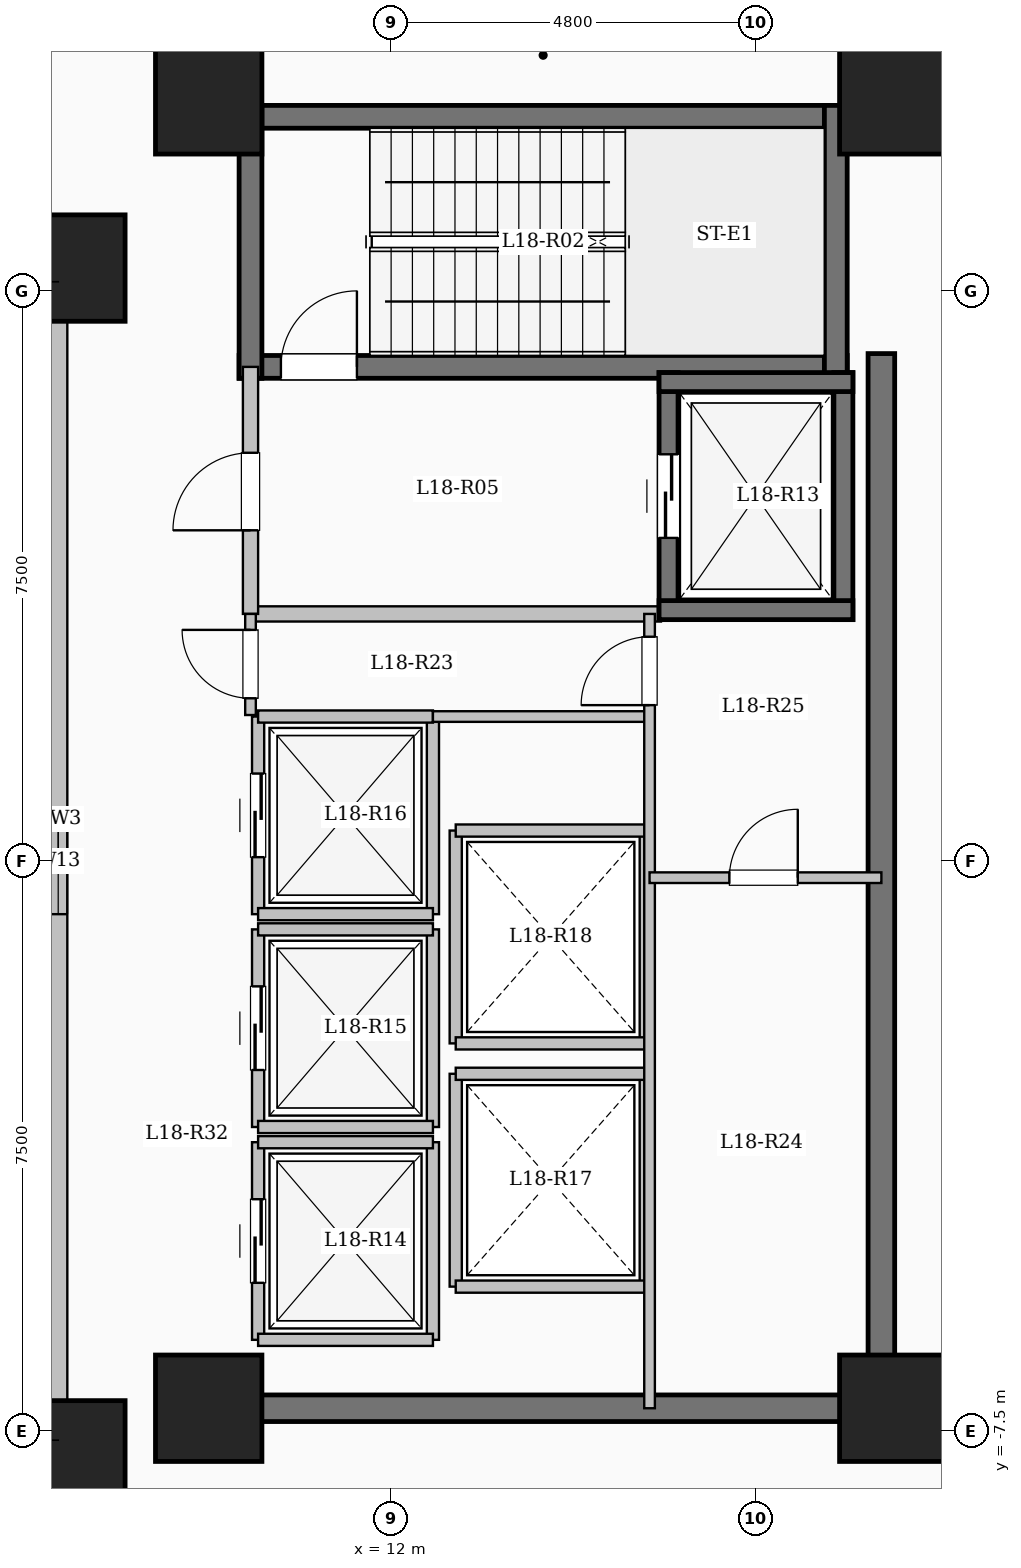
"""IFC4 building model, lengths in metres.
Left out: names, types, materials, properties, quantities, classifications, styles, units other than length and angle.
Written with IfcOpenShell. Run it as: python <this file> out.ifc"""

import sys

from ifc_helpers import new_model, si_unit, direction, frame, frame_2d, origin, origin_2d, place, context, subcontext, project, spatial, rectangle, extrude, element, fill, save


model = new_model("IFC4")
c1 = context("Model", 3, precision=1e-05, world=origin(), true_north=direction((0.0, 1.0)))
c2 = subcontext(c1, "Body", "Model", "MODEL_VIEW")
j1 = project(units=[si_unit("LENGTHUNIT", "METRE"), si_unit("PLANEANGLEUNIT", "RADIAN")], contexts=[c1])
p1 = place(None, origin())
s1 = spatial("IfcSite", under=j1, at=p1, CompositionType="ELEMENT")
p2 = place(p1, origin())
s2 = spatial("IfcBuilding", under=s1, at=p2, CompositionType="ELEMENT")
p3 = place(p2, frame((0.0, 0.0, 68.7)))
s3 = spatial("IfcBuildingStorey", under=s2, at=p3, CompositionType="ELEMENT", Elevation=68.7)
for number, where, z_axis, x_axis in (
    (1, (7.8, -7.8, 0.0), (0.0, 0.0, 1.0), (1.0, 0.0, 0.0)),
    (2, (7.8, 7.8, 0.0), (0.0, 0.0, 1.0), (1.0, 0.0, 0.0)),
    (3, (9.6, -7.2, 0.0), (0.0, 0.0, 1.0), (1.0, 0.0, 0.0)),
    (4, (9.6, 10.0, 0.0), (0.0, 0.0, 1.0), (1.0, 0.0, 0.0)),
    (5, (18.6, -7.2, 0.0), (0.0, 0.0, 1.0), (1.0, 0.0, 0.0)),
    (6, (18.6, 10.0, 0.0), (0.0, 0.0, 1.0), (1.0, 0.0, 0.0)),
):
    element("IfcColumn", number, at=place(p3, frame(where, z_axis=z_axis, x_axis=x_axis)), inside=s3, PredefinedType="COLUMN", context=c2, shape_type="SweptSolid", body=[
        extrude(rectangle(XDim=1.4, YDim=1.4, at=origin_2d()), origin(), (0.0, 0.0, 1.0), 4.5),
    ])
p4 = place(p3, frame((7.62, -7.62, 0.0), z_axis=(0.0, 0.0, 1.0), x_axis=(0.0, 1.0, 0.0)))
e7 = element("IfcWall", 7, at=p4, inside=s3, PredefinedType="SOLIDWALL", context=c2, shape_type="SweptSolid", body=[
    extrude(rectangle(XDim=15.24, YDim=0.24, at=frame_2d((7.62, 0.0))), origin(), (0.0, 0.0, 1.0), 4.2),
])
p5 = place(p4, frame((6.92, 0.0, 0.95)))
e8 = element("IfcOpeningElement", 8, at=p5, cuts=e7, PredefinedType="OPENING", context=c2, shape_type="SweptSolid", body=[
    extrude(rectangle(XDim=1.4, YDim=1.5, at=frame_2d((0.7, 0.75))), frame((0.0, 0.13, 0.0), z_axis=(0.0, -1.0, 0.0), x_axis=(1.0, 0.0, 0.0)), (0.0, 0.0, 1.0), 0.26),
])
p6 = place(p3, frame((10.0, 9.79, 0.0), z_axis=(0.0, 0.0, 1.0), x_axis=(1.0, 0.0, 0.0)))
e9 = element("IfcWall", 9, at=p6, inside=s3, PredefinedType="SHEAR", context=c2, shape_type="SweptSolid", body=[
    extrude(rectangle(XDim=8.0, YDim=0.3, at=frame_2d((4.0, 0.0))), origin(), (0.0, 0.0, 1.0), 4.5),
])
p7 = place(p3, frame((10.0, 6.5, 0.0), z_axis=(0.0, 0.0, 1.0), x_axis=(1.0, 0.0, 0.0)))
e10 = element("IfcWall", 10, at=p7, inside=s3, PredefinedType="SHEAR", context=c2, shape_type="SweptSolid", body=[
    extrude(rectangle(XDim=8.0, YDim=0.3, at=frame_2d((4.0, 0.0))), origin(), (0.0, 0.0, 1.0), 4.5),
])
p8 = place(p7, frame((0.55, 0.0, 0.0)))
e11 = element("IfcOpeningElement", 11, at=p8, cuts=e10, PredefinedType="OPENING", context=c2, shape_type="SweptSolid", body=[
    extrude(rectangle(XDim=1.0, YDim=2.15, at=frame_2d((0.5, 1.075))), frame((0.0, 0.16, 0.0), z_axis=(0.0, -1.0, 0.0), x_axis=(1.0, 0.0, 0.0)), (0.0, 0.0, 1.0), 0.32),
])
for number, where, z_axis, x_axis in (
    (12, (10.15, 6.35, 0.0), (0.0, 0.0, 1.0), (0.0, 1.0, 0.0)),
    (13, (17.85, 6.35, 0.0), (0.0, 0.0, 1.0), (0.0, 1.0, 0.0)),
):
    element("IfcWall", number, at=place(p3, frame(where, z_axis=z_axis, x_axis=x_axis)), inside=s3, PredefinedType="SHEAR", context=c2, shape_type="SweptSolid", body=[
        extrude(rectangle(XDim=3.59, YDim=0.3, at=frame_2d((1.795, 0.0))), origin(), (0.0, 0.0, 1.0), 4.5),
    ])
p9 = place(p3, frame((10.15, 3.25, 0.0), z_axis=(0.0, 0.0, 1.0), x_axis=(1.0, 0.0, 0.0)))
e14 = element("IfcWall", 14, at=p9, inside=s3, PredefinedType="SOLIDWALL", context=c2, shape_type="SweptSolid", body=[
    extrude(rectangle(XDim=5.4, YDim=0.2, at=frame_2d((2.7, 0.0))), origin(), (0.0, 0.0, 1.0), 4.2),
])
p10 = place(p3, frame((10.15, 3.25, 0.0), z_axis=(0.0, 0.0, 1.0), x_axis=(0.0, 1.0, 0.0)))
e15 = element("IfcWall", 15, at=p10, inside=s3, PredefinedType="SOLIDWALL", context=c2, shape_type="SweptSolid", body=[
    extrude(rectangle(XDim=3.25, YDim=0.2, at=frame_2d((1.625, 0.0))), origin(), (0.0, 0.0, 1.0), 4.2),
])
p11 = place(p10, frame((1.1, 0.0, 0.0)))
e16 = element("IfcOpeningElement", 16, at=p11, cuts=e15, PredefinedType="OPENING", context=c2, shape_type="SweptSolid", body=[
    extrude(rectangle(XDim=1.02, YDim=2.15, at=frame_2d((0.51, 1.075))), frame((0.0, 0.11, 0.0), z_axis=(0.0, -1.0, 0.0), x_axis=(1.0, 0.0, 0.0)), (0.0, 0.0, 1.0), 0.22),
])
p12 = place(p3, frame((15.65, 3.175, 0.0), z_axis=(0.0, 0.0, 1.0), x_axis=(0.0, 1.0, 0.0)))
e17 = element("IfcWall", 17, at=p12, inside=s3, PredefinedType="SHEAR", context=c2, shape_type="SweptSolid", body=[
    extrude(rectangle(XDim=3.25, YDim=0.25, at=frame_2d((1.625, 0.0))), origin(), (0.0, 0.0, 1.0), 4.5),
])
p13 = place(p12, frame((1.075, 0.0, 0.0)))
e18 = element("IfcOpeningElement", 18, at=p13, cuts=e17, PredefinedType="OPENING", context=c2, shape_type="SweptSolid", body=[
    extrude(rectangle(XDim=1.1, YDim=2.15, at=frame_2d((0.55, 1.075))), frame((0.0, 0.135, 0.0), z_axis=(0.0, -1.0, 0.0), x_axis=(1.0, 0.0, 0.0)), (0.0, 0.0, 1.0), 0.27),
])
p14 = place(p3, frame((17.95, 3.175, 0.0), z_axis=(0.0, 0.0, 1.0), x_axis=(0.0, 1.0, 0.0)))
e19 = element("IfcWall", 19, at=p14, inside=s3, PredefinedType="SHEAR", context=c2, shape_type="SweptSolid", body=[
    extrude(rectangle(XDim=3.25, YDim=0.25, at=frame_2d((1.625, 0.0))), origin(), (0.0, 0.0, 1.0), 4.5),
])
for number, where, z_axis, x_axis in (
    (20, (15.525, 3.3, 0.0), (0.0, 0.0, 1.0), (1.0, 0.0, 0.0)),
    (21, (15.525, 6.3, 0.0), (0.0, 0.0, 1.0), (1.0, 0.0, 0.0)),
):
    element("IfcWall", number, at=place(p3, frame(where, z_axis=z_axis, x_axis=x_axis)), inside=s3, PredefinedType="SHEAR", context=c2, shape_type="SweptSolid", body=[
        extrude(rectangle(XDim=2.55, YDim=0.25, at=frame_2d((1.275, 0.0))), origin(), (0.0, 0.0, 1.0), 4.5),
    ])
p15 = place(p3, frame((10.25, -6.3, 0.0), z_axis=(0.0, 0.0, 1.0), x_axis=(0.0, 1.0, 0.0)))
e22 = element("IfcWall", 22, at=p15, inside=s3, PredefinedType="SOLIDWALL", context=c2, shape_type="SweptSolid", body=[
    extrude(rectangle(XDim=2.6, YDim=0.16, at=frame_2d((1.3, 0.0))), origin(), (0.0, 0.0, 1.0), 4.2),
])
p16 = place(p15, frame((0.75, 0.0, 0.0)))
e23 = element("IfcOpeningElement", 23, at=p16, cuts=e22, PredefinedType="OPENING", context=c2, shape_type="SweptSolid", body=[
    extrude(rectangle(XDim=1.1, YDim=2.15, at=frame_2d((0.55, 1.075))), frame((0.0, 0.09, 0.0), z_axis=(0.0, -1.0, 0.0), x_axis=(1.0, 0.0, 0.0)), (0.0, 0.0, 1.0), 0.18),
])
p17 = place(p3, frame((12.55, -6.3, 0.0), z_axis=(0.0, 0.0, 1.0), x_axis=(0.0, 1.0, 0.0)))
e24 = element("IfcWall", 24, at=p17, inside=s3, PredefinedType="SOLIDWALL", context=c2, shape_type="SweptSolid", body=[
    extrude(rectangle(XDim=2.6, YDim=0.16, at=frame_2d((1.3, 0.0))), origin(), (0.0, 0.0, 1.0), 4.2),
])
for number, where, z_axis, x_axis in (
    (25, (10.25, -6.3, 0.0), (0.0, 0.0, 1.0), (1.0, 0.0, 0.0)),
    (26, (10.25, -3.7, 0.0), (0.0, 0.0, 1.0), (1.0, 0.0, 0.0)),
):
    element("IfcWall", number, at=place(p3, frame(where, z_axis=z_axis, x_axis=x_axis)), inside=s3, PredefinedType="SOLIDWALL", context=c2, shape_type="SweptSolid", body=[
        extrude(rectangle(XDim=2.3, YDim=0.16, at=frame_2d((1.15, 0.0))), origin(), (0.0, 0.0, 1.0), 4.2),
    ])
p18 = place(p3, frame((10.25, -3.5, 0.0), z_axis=(0.0, 0.0, 1.0), x_axis=(0.0, 1.0, 0.0)))
e27 = element("IfcWall", 27, at=p18, inside=s3, PredefinedType="SOLIDWALL", context=c2, shape_type="SweptSolid", body=[
    extrude(rectangle(XDim=2.6, YDim=0.16, at=frame_2d((1.3, 0.0))), origin(), (0.0, 0.0, 1.0), 4.2),
])
p19 = place(p18, frame((0.75, 0.0, 0.0)))
e28 = element("IfcOpeningElement", 28, at=p19, cuts=e27, PredefinedType="OPENING", context=c2, shape_type="SweptSolid", body=[
    extrude(rectangle(XDim=1.1, YDim=2.15, at=frame_2d((0.55, 1.075))), frame((0.0, 0.09, 0.0), z_axis=(0.0, -1.0, 0.0), x_axis=(1.0, 0.0, 0.0)), (0.0, 0.0, 1.0), 0.18),
])
p20 = place(p3, frame((12.55, -3.5, 0.0), z_axis=(0.0, 0.0, 1.0), x_axis=(0.0, 1.0, 0.0)))
e29 = element("IfcWall", 29, at=p20, inside=s3, PredefinedType="SOLIDWALL", context=c2, shape_type="SweptSolid", body=[
    extrude(rectangle(XDim=2.6, YDim=0.16, at=frame_2d((1.3, 0.0))), origin(), (0.0, 0.0, 1.0), 4.2),
])
for number, where, z_axis, x_axis in (
    (30, (10.25, -3.5, 0.0), (0.0, 0.0, 1.0), (1.0, 0.0, 0.0)),
    (31, (10.25, -0.9, 0.0), (0.0, 0.0, 1.0), (1.0, 0.0, 0.0)),
):
    element("IfcWall", number, at=place(p3, frame(where, z_axis=z_axis, x_axis=x_axis)), inside=s3, PredefinedType="SOLIDWALL", context=c2, shape_type="SweptSolid", body=[
        extrude(rectangle(XDim=2.3, YDim=0.16, at=frame_2d((1.15, 0.0))), origin(), (0.0, 0.0, 1.0), 4.2),
    ])
p21 = place(p3, frame((10.25, -0.7, 0.0), z_axis=(0.0, 0.0, 1.0), x_axis=(0.0, 1.0, 0.0)))
e32 = element("IfcWall", 32, at=p21, inside=s3, PredefinedType="SOLIDWALL", context=c2, shape_type="SweptSolid", body=[
    extrude(rectangle(XDim=2.6, YDim=0.16, at=frame_2d((1.3, 0.0))), origin(), (0.0, 0.0, 1.0), 4.2),
])
p22 = place(p21, frame((0.75, 0.0, 0.0)))
e33 = element("IfcOpeningElement", 33, at=p22, cuts=e32, PredefinedType="OPENING", context=c2, shape_type="SweptSolid", body=[
    extrude(rectangle(XDim=1.1, YDim=2.15, at=frame_2d((0.55, 1.075))), frame((0.0, 0.09, 0.0), z_axis=(0.0, -1.0, 0.0), x_axis=(1.0, 0.0, 0.0)), (0.0, 0.0, 1.0), 0.18),
])
p23 = place(p3, frame((12.55, -0.7, 0.0), z_axis=(0.0, 0.0, 1.0), x_axis=(0.0, 1.0, 0.0)))
e34 = element("IfcWall", 34, at=p23, inside=s3, PredefinedType="SOLIDWALL", context=c2, shape_type="SweptSolid", body=[
    extrude(rectangle(XDim=2.6, YDim=0.16, at=frame_2d((1.3, 0.0))), origin(), (0.0, 0.0, 1.0), 4.2),
])
for number, where, z_axis, x_axis in (
    (35, (10.25, -0.7, 0.0), (0.0, 0.0, 1.0), (1.0, 0.0, 0.0)),
    (36, (10.25, 1.9, 0.0), (0.0, 0.0, 1.0), (1.0, 0.0, 0.0)),
):
    element("IfcWall", number, at=place(p3, frame(where, z_axis=z_axis, x_axis=x_axis)), inside=s3, PredefinedType="SOLIDWALL", context=c2, shape_type="SweptSolid", body=[
        extrude(rectangle(XDim=2.3, YDim=0.16, at=frame_2d((1.15, 0.0))), origin(), (0.0, 0.0, 1.0), 4.2),
    ])
for number, where, z_axis, x_axis in (
    (37, (12.85, -5.6, 0.0), (0.0, 0.0, 1.0), (0.0, 1.0, 0.0)),
    (38, (15.35, -5.6, 0.0), (0.0, 0.0, 1.0), (0.0, 1.0, 0.0)),
):
    element("IfcWall", number, at=place(p3, frame(where, z_axis=z_axis, x_axis=x_axis)), inside=s3, PredefinedType="SOLIDWALL", context=c2, shape_type="SweptSolid", body=[
        extrude(rectangle(XDim=2.8, YDim=0.16, at=frame_2d((1.4, 0.0))), origin(), (0.0, 0.0, 1.0), 4.2),
    ])
for number, where, z_axis, x_axis in (
    (39, (12.85, -5.6, 0.0), (0.0, 0.0, 1.0), (1.0, 0.0, 0.0)),
    (40, (12.85, -2.8, 0.0), (0.0, 0.0, 1.0), (1.0, 0.0, 0.0)),
):
    element("IfcWall", number, at=place(p3, frame(where, z_axis=z_axis, x_axis=x_axis)), inside=s3, PredefinedType="SOLIDWALL", context=c2, shape_type="SweptSolid", body=[
        extrude(rectangle(XDim=2.5, YDim=0.16, at=frame_2d((1.25, 0.0))), origin(), (0.0, 0.0, 1.0), 4.2),
    ])
for number, where, z_axis, x_axis in (
    (41, (12.85, -2.4, 0.0), (0.0, 0.0, 1.0), (0.0, 1.0, 0.0)),
    (42, (15.35, -2.4, 0.0), (0.0, 0.0, 1.0), (0.0, 1.0, 0.0)),
):
    element("IfcWall", number, at=place(p3, frame(where, z_axis=z_axis, x_axis=x_axis)), inside=s3, PredefinedType="SOLIDWALL", context=c2, shape_type="SweptSolid", body=[
        extrude(rectangle(XDim=2.8, YDim=0.16, at=frame_2d((1.4, 0.0))), origin(), (0.0, 0.0, 1.0), 4.2),
    ])
for number, where, z_axis, x_axis in (
    (43, (12.85, -2.4, 0.0), (0.0, 0.0, 1.0), (1.0, 0.0, 0.0)),
    (44, (12.85, 0.4, 0.0), (0.0, 0.0, 1.0), (1.0, 0.0, 0.0)),
):
    element("IfcWall", number, at=place(p3, frame(where, z_axis=z_axis, x_axis=x_axis)), inside=s3, PredefinedType="SOLIDWALL", context=c2, shape_type="SweptSolid", body=[
        extrude(rectangle(XDim=2.5, YDim=0.16, at=frame_2d((1.25, 0.0))), origin(), (0.0, 0.0, 1.0), 4.2),
    ])
p24 = place(p3, frame((18.45, -7.375, 0.0), z_axis=(0.0, 0.0, 1.0), x_axis=(0.0, 1.0, 0.0)))
e45 = element("IfcWall", 45, at=p24, inside=s3, PredefinedType="SHEAR", context=c2, shape_type="SweptSolid", body=[
    extrude(rectangle(XDim=14.05, YDim=0.35, at=frame_2d((7.025, 0.0))), origin(), (0.0, 0.0, 1.0), 4.5),
])
p25 = place(p3, frame((10.075, -7.2, 0.0), z_axis=(0.0, 0.0, 1.0), x_axis=(1.0, 0.0, 0.0)))
e46 = element("IfcWall", 46, at=p25, inside=s3, PredefinedType="SHEAR", context=c2, shape_type="SweptSolid", body=[
    extrude(rectangle(XDim=8.55, YDim=0.35, at=frame_2d((4.275, 0.0))), origin(), (0.0, 0.0, 1.0), 4.5),
])
p26 = place(p3, frame((12.55, 1.9, 0.0), z_axis=(0.0, 0.0, 1.0), x_axis=(1.0, 0.0, 0.0)))
e47 = element("IfcWall", 47, at=p26, inside=s3, PredefinedType="PARTITIONING", context=c2, shape_type="SweptSolid", body=[
    extrude(rectangle(XDim=2.85, YDim=0.14, at=frame_2d((1.425, 0.0))), origin(), (0.0, 0.0, 1.0), 4.2),
])
p27 = place(p3, frame((10.15, 1.92, 0.0), z_axis=(0.0, 0.0, 1.0), x_axis=(0.0, 1.0, 0.0)))
e48 = element("IfcWall", 48, at=p27, inside=s3, PredefinedType="PARTITIONING", context=c2, shape_type="SweptSolid", body=[
    extrude(rectangle(XDim=1.33, YDim=0.14, at=frame_2d((0.665, 0.0))), origin(), (0.0, 0.0, 1.0), 4.2),
])
p28 = place(p27, frame((0.22, 0.0, 0.0)))
e49 = element("IfcOpeningElement", 49, at=p28, cuts=e48, PredefinedType="OPENING", context=c2, shape_type="SweptSolid", body=[
    extrude(rectangle(XDim=0.9, YDim=2.08, at=frame_2d((0.45, 1.04))), frame((0.0, 0.08, 0.0), z_axis=(0.0, -1.0, 0.0), x_axis=(1.0, 0.0, 0.0)), (0.0, 0.0, 1.0), 0.16),
])
p29 = place(p3, frame((15.4, -7.2, 0.0), z_axis=(0.0, 0.0, 1.0), x_axis=(0.0, 1.0, 0.0)))
e50 = element("IfcWall", 50, at=p29, inside=s3, PredefinedType="PARTITIONING", context=c2, shape_type="SweptSolid", body=[
    extrude(rectangle(XDim=10.45, YDim=0.14, at=frame_2d((5.225, 0.0))), origin(), (0.0, 0.0, 1.0), 4.2),
])
p30 = place(p29, frame((9.25, 0.0, 0.0)))
e51 = element("IfcOpeningElement", 51, at=p30, cuts=e50, PredefinedType="OPENING", context=c2, shape_type="SweptSolid", body=[
    extrude(rectangle(XDim=0.9, YDim=2.08, at=frame_2d((0.45, 1.04))), frame((0.0, 0.08, 0.0), z_axis=(0.0, -1.0, 0.0), x_axis=(1.0, 0.0, 0.0)), (0.0, 0.0, 1.0), 0.16),
])
p31 = place(p3, frame((15.4, -0.22, 0.0), z_axis=(0.0, 0.0, 1.0), x_axis=(1.0, 0.0, 0.0)))
e52 = element("IfcWall", 52, at=p31, inside=s3, PredefinedType="PARTITIONING", context=c2, shape_type="SweptSolid", body=[
    extrude(rectangle(XDim=3.05, YDim=0.14, at=frame_2d((1.525, 0.0))), origin(), (0.0, 0.0, 1.0), 4.2),
])
p32 = place(p31, frame((1.05, 0.0, 0.0)))
e53 = element("IfcOpeningElement", 53, at=p32, cuts=e52, PredefinedType="OPENING", context=c2, shape_type="SweptSolid", body=[
    extrude(rectangle(XDim=0.9, YDim=2.08, at=frame_2d((0.45, 1.04))), frame((0.0, 0.08, 0.0), z_axis=(0.0, -1.0, 0.0), x_axis=(1.0, 0.0, 0.0)), (0.0, 0.0, 1.0), 0.16),
])
p33 = place(p5, origin())
e54 = element("IfcWindow", 54, at=p33, inside=s3, PartitioningType="SINGLE_PANEL", PredefinedType="WINDOW", context=c2, shape_type="SweptSolid", body=[
    extrude(rectangle(XDim=1.4, YDim=1.5, at=frame_2d((0.7, 0.75))), frame((0.0, 0.03, 0.0), z_axis=(0.0, -1.0, 0.0), x_axis=(1.0, 0.0, 0.0)), (0.0, 0.0, 1.0), 0.06),
])
fill(e8, e54)
p34 = place(p8, origin())
e55 = element("IfcDoor", 55, at=p34, inside=s3, OperationType="SINGLE_SWING_RIGHT", PredefinedType="DOOR", context=c2, shape_type="SweptSolid", body=[
    extrude(rectangle(XDim=1.0, YDim=2.15, at=frame_2d((0.5, 1.075))), frame((0.0, 0.025, 0.0), z_axis=(0.0, -1.0, 0.0), x_axis=(1.0, 0.0, 0.0)), (0.0, 0.0, 1.0), 0.05),
])
fill(e11, e55)
p35 = place(p11, origin())
e56 = element("IfcDoor", 56, at=p35, inside=s3, OperationType="SINGLE_SWING_LEFT", PredefinedType="DOOR", context=c2, shape_type="SweptSolid", body=[
    extrude(rectangle(XDim=1.02, YDim=2.15, at=frame_2d((0.51, 1.075))), frame((0.0, 0.025, 0.0), z_axis=(0.0, -1.0, 0.0), x_axis=(1.0, 0.0, 0.0)), (0.0, 0.0, 1.0), 0.05),
])
fill(e16, e56)
p36 = place(p13, origin())
e57 = element("IfcDoor", 57, at=p36, inside=s3, OperationType="SLIDING_TO_LEFT", PredefinedType="DOOR", context=c2, shape_type="SweptSolid", body=[
    extrude(rectangle(XDim=1.1, YDim=2.15, at=frame_2d((0.55, 1.075))), frame((0.0, 0.025, 0.0), z_axis=(0.0, -1.0, 0.0), x_axis=(1.0, 0.0, 0.0)), (0.0, 0.0, 1.0), 0.05),
])
fill(e18, e57)
p37 = place(p16, origin())
e58 = element("IfcDoor", 58, at=p37, inside=s3, OperationType="SLIDING_TO_LEFT", PredefinedType="DOOR", context=c2, shape_type="SweptSolid", body=[
    extrude(rectangle(XDim=1.1, YDim=2.15, at=frame_2d((0.55, 1.075))), frame((0.0, 0.025, 0.0), z_axis=(0.0, -1.0, 0.0), x_axis=(1.0, 0.0, 0.0)), (0.0, 0.0, 1.0), 0.05),
])
fill(e23, e58)
p38 = place(p19, origin())
e59 = element("IfcDoor", 59, at=p38, inside=s3, OperationType="SLIDING_TO_LEFT", PredefinedType="DOOR", context=c2, shape_type="SweptSolid", body=[
    extrude(rectangle(XDim=1.1, YDim=2.15, at=frame_2d((0.55, 1.075))), frame((0.0, 0.025, 0.0), z_axis=(0.0, -1.0, 0.0), x_axis=(1.0, 0.0, 0.0)), (0.0, 0.0, 1.0), 0.05),
])
fill(e28, e59)
p39 = place(p22, origin())
e60 = element("IfcDoor", 60, at=p39, inside=s3, OperationType="SLIDING_TO_LEFT", PredefinedType="DOOR", context=c2, shape_type="SweptSolid", body=[
    extrude(rectangle(XDim=1.1, YDim=2.15, at=frame_2d((0.55, 1.075))), frame((0.0, 0.025, 0.0), z_axis=(0.0, -1.0, 0.0), x_axis=(1.0, 0.0, 0.0)), (0.0, 0.0, 1.0), 0.05),
])
fill(e33, e60)
p40 = place(p28, origin())
e61 = element("IfcDoor", 61, at=p40, inside=s3, OperationType="SINGLE_SWING_RIGHT", PredefinedType="DOOR", context=c2, shape_type="SweptSolid", body=[
    extrude(rectangle(XDim=0.9, YDim=2.08, at=frame_2d((0.45, 1.04))), frame((0.0, 0.025, 0.0), z_axis=(0.0, -1.0, 0.0), x_axis=(1.0, 0.0, 0.0)), (0.0, 0.0, 1.0), 0.05),
])
fill(e49, e61)
p41 = place(p30, origin())
e62 = element("IfcDoor", 62, at=p41, inside=s3, OperationType="SINGLE_SWING_LEFT", PredefinedType="DOOR", context=c2, shape_type="SweptSolid", body=[
    extrude(rectangle(XDim=0.9, YDim=2.08, at=frame_2d((0.45, 1.04))), frame((0.0, 0.025, 0.0), z_axis=(0.0, -1.0, 0.0), x_axis=(1.0, 0.0, 0.0)), (0.0, 0.0, 1.0), 0.05),
])
fill(e51, e62)
p42 = place(p32, origin())
e63 = element("IfcDoor", 63, at=p42, inside=s3, OperationType="SINGLE_SWING_RIGHT", PredefinedType="DOOR", context=c2, shape_type="SweptSolid", body=[
    extrude(rectangle(XDim=0.9, YDim=2.08, at=frame_2d((0.45, 1.04))), frame((0.0, 0.025, 0.0), z_axis=(0.0, -1.0, 0.0), x_axis=(1.0, 0.0, 0.0)), (0.0, 0.0, 1.0), 0.05),
])
fill(e53, e63)
save(model, sys.argv[1])
